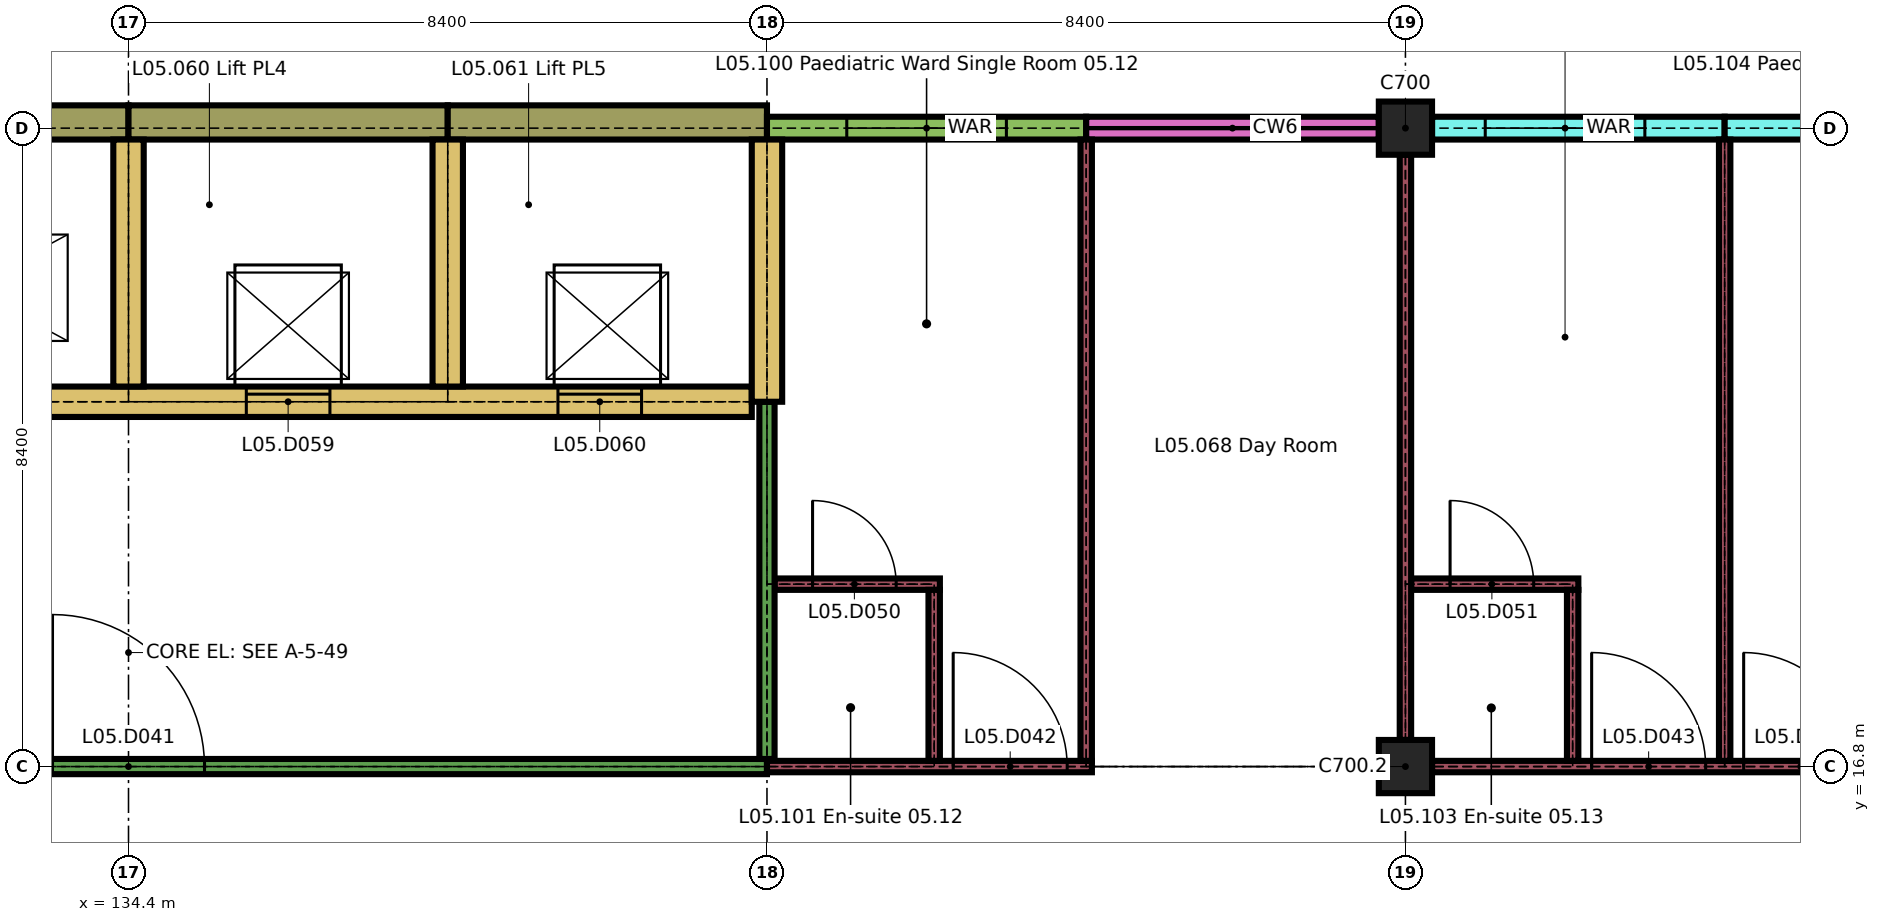
"""IFC4 building model, lengths in metres.
Left out: names, types, materials, properties, quantities, classifications, styles, units other than length and angle.
Written with IfcOpenShell. Run it as: python <this file> out.ifc"""

import sys

from ifc_helpers import new_model, si_unit, direction, frame, frame_2d, origin, origin_2d, place, context, subcontext, project, spatial, rectangle, extrude, element, fill, save


model = new_model("IFC4")
c1 = context("Model", 3, precision=1e-05, world=origin(), true_north=direction((0.0, 1.0)))
c2 = subcontext(c1, "Body", "Model", "MODEL_VIEW")
j1 = project(units=[si_unit("LENGTHUNIT", "METRE"), si_unit("PLANEANGLEUNIT", "RADIAN")], contexts=[c1])
p1 = place(None, origin())
s1 = spatial("IfcSite", under=j1, at=p1, CompositionType="ELEMENT")
p2 = place(p1, origin())
s2 = spatial("IfcBuilding", under=s1, at=p2, CompositionType="ELEMENT")
p3 = place(p2, frame((0.0, 0.0, 22.5)))
s3 = spatial("IfcBuildingStorey", under=s2, at=p3, CompositionType="ELEMENT", Elevation=22.5)
for number, where, z_axis, x_axis in (
    (1, (151.2, 16.8, 0.0), (0.0, 0.0, 1.0), (1.0, 0.0, 0.0)),
    (2, (151.2, 25.2, 0.0), (0.0, 0.0, 1.0), (1.0, 0.0, 0.0)),
):
    element("IfcColumn", number, at=place(p3, frame(where, z_axis=z_axis, x_axis=x_axis)), inside=s3, PredefinedType="COLUMN", context=c2, shape_type="SweptSolid", body=[
        extrude(rectangle(XDim=0.7, YDim=0.7, at=origin_2d()), origin(), (0.0, 0.0, 1.0), 3.26),
    ])
p4 = place(p3, frame((130.2, 25.275, 0.0), z_axis=(0.0, 0.0, 1.0), x_axis=(1.0, 0.0, 0.0)))
e3 = element("IfcWall", 3, at=p4, inside=s3, PredefinedType="SOLIDWALL", context=c2, shape_type="SweptSolid", body=[
    extrude(rectangle(XDim=4.2, YDim=0.45, at=frame_2d((2.1, 0.0))), origin(), (0.0, 0.0, 1.0), 3.26),
])
p5 = place(p3, frame((134.4, 25.275, 0.0), z_axis=(0.0, 0.0, 1.0), x_axis=(1.0, 0.0, 0.0)))
e4 = element("IfcWall", 4, at=p5, inside=s3, PredefinedType="SOLIDWALL", context=c2, shape_type="SweptSolid", body=[
    extrude(rectangle(XDim=4.2, YDim=0.45, at=frame_2d((2.1, 0.0))), origin(), (0.0, 0.0, 1.0), 3.26),
])
p6 = place(p3, frame((138.6, 25.275, 0.0), z_axis=(0.0, 0.0, 1.0), x_axis=(1.0, 0.0, 0.0)))
e5 = element("IfcWall", 5, at=p6, inside=s3, PredefinedType="SOLIDWALL", context=c2, shape_type="SweptSolid", body=[
    extrude(rectangle(XDim=4.2, YDim=0.45, at=frame_2d((2.1, 0.0))), origin(), (0.0, 0.0, 1.0), 3.26),
])
p7 = place(p3, frame((142.8, 25.2, 0.0), z_axis=(0.0, 0.0, 1.0), x_axis=(1.0, 0.0, 0.0)))
e6 = element("IfcWall", 6, at=p7, inside=s3, PredefinedType="SOLIDWALL", context=c2, shape_type="SweptSolid", body=[
    extrude(rectangle(XDim=4.2, YDim=0.3, at=frame_2d((2.1, 0.0))), origin(), (0.0, 0.0, 1.0), 2.96),
])
p8 = place(p7, frame((1.05, 0.0, 0.9)))
e7 = element("IfcOpeningElement", 7, at=p8, cuts=e6, PredefinedType="OPENING", context=c2, shape_type="SweptSolid", body=[
    extrude(rectangle(XDim=2.1, YDim=1.5, at=frame_2d((1.05, 0.75))), frame((0.0, 0.16, 0.0), z_axis=(0.0, -1.0, 0.0), x_axis=(1.0, 0.0, 0.0)), (0.0, 0.0, 1.0), 0.32),
])
p9 = place(p3, frame((147.0, 25.2, 0.0), z_axis=(0.0, 0.0, 1.0), x_axis=(1.0, 0.0, 0.0)))
e8 = element("IfcWall", 8, at=p9, inside=s3, PredefinedType="SOLIDWALL", context=c2, shape_type="SweptSolid", body=[
    extrude(rectangle(XDim=3.85, YDim=0.3, at=frame_2d((1.925, 0.0))), origin(), (0.0, 0.0, 1.0), 0.6),
])
p10 = place(p3, frame((151.55, 25.2, 0.0), z_axis=(0.0, 0.0, 1.0), x_axis=(1.0, 0.0, 0.0)))
e9 = element("IfcWall", 9, at=p10, inside=s3, PredefinedType="SOLIDWALL", context=c2, shape_type="SweptSolid", body=[
    extrude(rectangle(XDim=3.85, YDim=0.3, at=frame_2d((1.925, 0.0))), origin(), (0.0, 0.0, 1.0), 3.26),
])
p11 = place(p10, frame((0.7, 0.0, 0.9)))
e10 = element("IfcOpeningElement", 10, at=p11, cuts=e9, PredefinedType="OPENING", context=c2, shape_type="SweptSolid", body=[
    extrude(rectangle(XDim=2.1, YDim=1.5, at=frame_2d((1.05, 0.75))), frame((0.0, 0.16, 0.0), z_axis=(0.0, -1.0, 0.0), x_axis=(1.0, 0.0, 0.0)), (0.0, 0.0, 1.0), 0.32),
])
p12 = place(p3, frame((155.4, 25.2, 0.0), z_axis=(0.0, 0.0, 1.0), x_axis=(1.0, 0.0, 0.0)))
e11 = element("IfcWall", 11, at=p12, inside=s3, PredefinedType="SOLIDWALL", context=c2, shape_type="SweptSolid", body=[
    extrude(rectangle(XDim=4.2, YDim=0.3, at=frame_2d((2.1, 0.0))), origin(), (0.0, 0.0, 1.0), 3.26),
])
p13 = place(p12, frame((1.05, 0.0, 0.9)))
e12 = element("IfcOpeningElement", 12, at=p13, cuts=e11, PredefinedType="OPENING", context=c2, shape_type="SweptSolid", body=[
    extrude(rectangle(XDim=2.1, YDim=1.5, at=frame_2d((1.05, 0.75))), frame((0.0, 0.16, 0.0), z_axis=(0.0, -1.0, 0.0), x_axis=(1.0, 0.0, 0.0)), (0.0, 0.0, 1.0), 0.32),
])
p14 = place(p3, frame((117.7, 16.8, 0.0), z_axis=(0.0, 0.0, 1.0), x_axis=(1.0, 0.0, 0.0)))
e13 = element("IfcWall", 13, at=p14, inside=s3, PredefinedType="PARTITIONING", context=c2, shape_type="SweptSolid", body=[
    extrude(rectangle(XDim=25.1, YDim=0.2, at=frame_2d((12.55, 0.0))), origin(), (0.0, 0.0, 1.0), 3.26),
])
p15 = place(p14, frame((3.3, 0.0, 0.0)))
e14 = element("IfcOpeningElement", 14, at=p15, cuts=e13, PredefinedType="OPENING", context=c2, shape_type="SweptSolid", body=[
    extrude(rectangle(XDim=1.7, YDim=2.4, at=frame_2d((0.85, 1.2))), frame((0.0, 0.11, 0.0), z_axis=(0.0, -1.0, 0.0), x_axis=(1.0, 0.0, 0.0)), (0.0, 0.0, 1.0), 0.22),
])
p16 = place(p14, frame((15.7, 0.0, 0.0)))
e15 = element("IfcOpeningElement", 15, at=p16, cuts=e13, PredefinedType="OPENING", context=c2, shape_type="SweptSolid", body=[
    extrude(rectangle(XDim=2.0, YDim=2.4, at=frame_2d((1.0, 1.2))), frame((0.0, 0.11, 0.0), z_axis=(0.0, -1.0, 0.0), x_axis=(1.0, 0.0, 0.0)), (0.0, 0.0, 1.0), 0.22),
])
p17 = place(p3, frame((142.8, 16.8, 0.0), z_axis=(0.0, 0.0, 1.0), x_axis=(1.0, 0.0, 0.0)))
e16 = element("IfcWall", 16, at=p17, inside=s3, PredefinedType="PARTITIONING", context=c2, shape_type="SweptSolid", body=[
    extrude(rectangle(XDim=4.275, YDim=0.15, at=frame_2d((2.137, 0.0))), origin(), (0.0, 0.0, 1.0), 3.26),
])
p18 = place(p17, frame((2.45, 0.0, 0.0)))
e17 = element("IfcOpeningElement", 17, at=p18, cuts=e16, PredefinedType="OPENING", context=c2, shape_type="SweptSolid", body=[
    extrude(rectangle(XDim=1.5, YDim=2.4, at=frame_2d((0.75, 1.2))), frame((0.0, 0.085, 0.0), z_axis=(0.0, -1.0, 0.0), x_axis=(1.0, 0.0, 0.0)), (0.0, 0.0, 1.0), 0.17),
])
p19 = place(p3, frame((151.55, 16.8, 0.0), z_axis=(0.0, 0.0, 1.0), x_axis=(1.0, 0.0, 0.0)))
e18 = element("IfcWall", 18, at=p19, inside=s3, PredefinedType="PARTITIONING", context=c2, shape_type="SweptSolid", body=[
    extrude(rectangle(XDim=8.05, YDim=0.15, at=frame_2d((4.025, 0.0))), origin(), (0.0, 0.0, 1.0), 3.26),
])
p20 = place(p19, frame((2.1, 0.0, 0.0)))
e19 = element("IfcOpeningElement", 19, at=p20, cuts=e18, PredefinedType="OPENING", context=c2, shape_type="SweptSolid", body=[
    extrude(rectangle(XDim=1.5, YDim=2.4, at=frame_2d((0.75, 1.2))), frame((0.0, 0.085, 0.0), z_axis=(0.0, -1.0, 0.0), x_axis=(1.0, 0.0, 0.0)), (0.0, 0.0, 1.0), 0.17),
])
p21 = place(p19, frame((4.1, 0.0, 0.0)))
e20 = element("IfcOpeningElement", 20, at=p21, cuts=e18, PredefinedType="OPENING", context=c2, shape_type="SweptSolid", body=[
    extrude(rectangle(XDim=1.5, YDim=2.4, at=frame_2d((0.75, 1.2))), frame((0.0, 0.085, 0.0), z_axis=(0.0, -1.0, 0.0), x_axis=(1.0, 0.0, 0.0)), (0.0, 0.0, 1.0), 0.17),
])
p22 = place(p3, frame((142.9, 19.2, 0.0), z_axis=(0.0, 0.0, 1.0), x_axis=(1.0, 0.0, 0.0)))
e21 = element("IfcWall", 21, at=p22, inside=s3, PredefinedType="PARTITIONING", context=c2, shape_type="SweptSolid", body=[
    extrude(rectangle(XDim=2.175, YDim=0.15, at=frame_2d((1.087, 0.0))), origin(), (0.0, 0.0, 1.0), 3.26),
])
p23 = place(p22, frame((0.5, 0.0, 0.0)))
e22 = element("IfcOpeningElement", 22, at=p23, cuts=e21, PredefinedType="OPENING", context=c2, shape_type="SweptSolid", body=[
    extrude(rectangle(XDim=1.1, YDim=2.1, at=frame_2d((0.55, 1.05))), frame((0.0, 0.085, 0.0), z_axis=(0.0, -1.0, 0.0), x_axis=(1.0, 0.0, 0.0)), (0.0, 0.0, 1.0), 0.17),
])
p24 = place(p3, frame((151.275, 19.2, 0.0), z_axis=(0.0, 0.0, 1.0), x_axis=(1.0, 0.0, 0.0)))
e23 = element("IfcWall", 23, at=p24, inside=s3, PredefinedType="PARTITIONING", context=c2, shape_type="SweptSolid", body=[
    extrude(rectangle(XDim=2.2, YDim=0.15, at=frame_2d((1.1, 0.0))), origin(), (0.0, 0.0, 1.0), 3.26),
])
p25 = place(p24, frame((0.512, 0.0, 0.0)))
e24 = element("IfcOpeningElement", 24, at=p25, cuts=e23, PredefinedType="OPENING", context=c2, shape_type="SweptSolid", body=[
    extrude(rectangle(XDim=1.1, YDim=2.1, at=frame_2d((0.55, 1.05))), frame((0.0, 0.085, 0.0), z_axis=(0.0, -1.0, 0.0), x_axis=(1.0, 0.0, 0.0)), (0.0, 0.0, 1.0), 0.17),
])
p26 = place(p3, frame((117.8, 21.6, 0.0), z_axis=(0.0, 0.0, 1.0), x_axis=(1.0, 0.0, 0.0)))
e25 = element("IfcWall", 25, at=p26, inside=s3, PredefinedType="SHEAR", context=c2, shape_type="SweptSolid", body=[
    extrude(rectangle(XDim=24.8, YDim=0.4, at=frame_2d((12.4, 0.0))), origin(), (0.0, 0.0, 1.0), 3.26),
])
p27 = place(p26, frame((1.35, 0.0, 0.0)))
e26 = element("IfcOpeningElement", 26, at=p27, cuts=e25, PredefinedType="OPENING", context=c2, shape_type="SweptSolid", body=[
    extrude(rectangle(XDim=1.3, YDim=2.1, at=frame_2d((0.65, 1.05))), frame((0.0, 0.21, 0.0), z_axis=(0.0, -1.0, 0.0), x_axis=(1.0, 0.0, 0.0)), (0.0, 0.0, 1.0), 0.42),
])
p28 = place(p26, frame((5.45, 0.0, 0.0)))
e27 = element("IfcOpeningElement", 27, at=p28, cuts=e25, PredefinedType="OPENING", context=c2, shape_type="SweptSolid", body=[
    extrude(rectangle(XDim=1.3, YDim=2.1, at=frame_2d((0.65, 1.05))), frame((0.0, 0.21, 0.0), z_axis=(0.0, -1.0, 0.0), x_axis=(1.0, 0.0, 0.0)), (0.0, 0.0, 1.0), 0.42),
])
p29 = place(p26, frame((9.65, 0.0, 0.0)))
e28 = element("IfcOpeningElement", 28, at=p29, cuts=e25, PredefinedType="OPENING", context=c2, shape_type="SweptSolid", body=[
    extrude(rectangle(XDim=1.3, YDim=2.1, at=frame_2d((0.65, 1.05))), frame((0.0, 0.21, 0.0), z_axis=(0.0, -1.0, 0.0), x_axis=(1.0, 0.0, 0.0)), (0.0, 0.0, 1.0), 0.42),
])
p30 = place(p26, frame((13.85, 0.0, 0.0)))
e29 = element("IfcOpeningElement", 29, at=p30, cuts=e25, PredefinedType="OPENING", context=c2, shape_type="SweptSolid", body=[
    extrude(rectangle(XDim=1.3, YDim=2.1, at=frame_2d((0.65, 1.05))), frame((0.0, 0.21, 0.0), z_axis=(0.0, -1.0, 0.0), x_axis=(1.0, 0.0, 0.0)), (0.0, 0.0, 1.0), 0.42),
])
p31 = place(p26, frame((18.15, 0.0, 0.0)))
e30 = element("IfcOpeningElement", 30, at=p31, cuts=e25, PredefinedType="OPENING", context=c2, shape_type="SweptSolid", body=[
    extrude(rectangle(XDim=1.1, YDim=2.1, at=frame_2d((0.55, 1.05))), frame((0.0, 0.21, 0.0), z_axis=(0.0, -1.0, 0.0), x_axis=(1.0, 0.0, 0.0)), (0.0, 0.0, 1.0), 0.42),
])
p32 = place(p26, frame((22.25, 0.0, 0.0)))
e31 = element("IfcOpeningElement", 31, at=p32, cuts=e25, PredefinedType="OPENING", context=c2, shape_type="SweptSolid", body=[
    extrude(rectangle(XDim=1.1, YDim=2.1, at=frame_2d((0.55, 1.05))), frame((0.0, 0.21, 0.0), z_axis=(0.0, -1.0, 0.0), x_axis=(1.0, 0.0, 0.0)), (0.0, 0.0, 1.0), 0.42),
])
for number, where, z_axis, x_axis in (
    (32, (134.4, 21.8, 0.0), (0.0, 0.0, 1.0), (0.0, 1.0, 0.0)),
    (33, (138.6, 21.8, 0.0), (0.0, 0.0, 1.0), (0.0, 1.0, 0.0)),
):
    element("IfcWall", number, at=place(p3, frame(where, z_axis=z_axis, x_axis=x_axis)), inside=s3, PredefinedType="SHEAR", context=c2, shape_type="SweptSolid", body=[
        extrude(rectangle(XDim=3.25, YDim=0.4, at=frame_2d((1.625, 0.0))), origin(), (0.0, 0.0, 1.0), 3.26),
    ])
p33 = place(p3, frame((142.8, 16.9, 0.0), z_axis=(0.0, 0.0, 1.0), x_axis=(0.0, 1.0, 0.0)))
e34 = element("IfcWall", 34, at=p33, inside=s3, PredefinedType="PARTITIONING", context=c2, shape_type="SweptSolid", body=[
    extrude(rectangle(XDim=4.7, YDim=0.2, at=frame_2d((2.35, 0.0))), origin(), (0.0, 0.0, 1.0), 3.26),
])
p34 = place(p3, frame((142.8, 21.6, 0.0), z_axis=(0.0, 0.0, 1.0), x_axis=(0.0, 1.0, 0.0)))
e35 = element("IfcWall", 35, at=p34, inside=s3, PredefinedType="SHEAR", context=c2, shape_type="SweptSolid", body=[
    extrude(rectangle(XDim=3.45, YDim=0.4, at=frame_2d((1.725, 0.0))), origin(), (0.0, 0.0, 1.0), 3.26),
])
p35 = place(p3, frame((145.0, 16.875, 0.0), z_axis=(0.0, 0.0, 1.0), x_axis=(0.0, 1.0, 0.0)))
e36 = element("IfcWall", 36, at=p35, inside=s3, PredefinedType="PARTITIONING", context=c2, shape_type="SweptSolid", body=[
    extrude(rectangle(XDim=2.25, YDim=0.15, at=frame_2d((1.125, 0.0))), origin(), (0.0, 0.0, 1.0), 3.26),
])
p36 = place(p3, frame((147.0, 16.875, 0.0), z_axis=(0.0, 0.0, 1.0), x_axis=(0.0, 1.0, 0.0)))
e37 = element("IfcWall", 37, at=p36, inside=s3, PredefinedType="PARTITIONING", context=c2, shape_type="SweptSolid", body=[
    extrude(rectangle(XDim=8.175, YDim=0.15, at=frame_2d((4.087, 0.0))), origin(), (0.0, 0.0, 1.0), 3.26),
])
p37 = place(p3, frame((151.2, 17.15, 0.0), z_axis=(0.0, 0.0, 1.0), x_axis=(0.0, 1.0, 0.0)))
e38 = element("IfcWall", 38, at=p37, inside=s3, PredefinedType="PARTITIONING", context=c2, shape_type="SweptSolid", body=[
    extrude(rectangle(XDim=7.7, YDim=0.15, at=frame_2d((3.85, 0.0))), origin(), (0.0, 0.0, 1.0), 3.26),
])
p38 = place(p3, frame((153.4, 16.875, 0.0), z_axis=(0.0, 0.0, 1.0), x_axis=(0.0, 1.0, 0.0)))
e39 = element("IfcWall", 39, at=p38, inside=s3, PredefinedType="PARTITIONING", context=c2, shape_type="SweptSolid", body=[
    extrude(rectangle(XDim=2.25, YDim=0.15, at=frame_2d((1.125, 0.0))), origin(), (0.0, 0.0, 1.0), 3.26),
])
p39 = place(p3, frame((155.4, 16.875, 0.0), z_axis=(0.0, 0.0, 1.0), x_axis=(0.0, 1.0, 0.0)))
e40 = element("IfcWall", 40, at=p39, inside=s3, PredefinedType="PARTITIONING", context=c2, shape_type="SweptSolid", body=[
    extrude(rectangle(XDim=8.175, YDim=0.15, at=frame_2d((4.087, 0.0))), origin(), (0.0, 0.0, 1.0), 3.26),
])
p40 = place(p8, origin())
e41 = element("IfcWindow", 41, at=p40, inside=s3, PartitioningType="DOUBLE_PANEL_VERTICAL", PredefinedType="WINDOW", context=c2, shape_type="SweptSolid", body=[
    extrude(rectangle(XDim=2.1, YDim=1.5, at=frame_2d((1.05, 0.75))), frame((0.0, 0.05, 0.0), z_axis=(0.0, -1.0, 0.0), x_axis=(1.0, 0.0, 0.0)), (0.0, 0.0, 1.0), 0.1),
])
fill(e7, e41)
p41 = place(p11, origin())
e42 = element("IfcWindow", 42, at=p41, inside=s3, PartitioningType="DOUBLE_PANEL_VERTICAL", PredefinedType="WINDOW", context=c2, shape_type="SweptSolid", body=[
    extrude(rectangle(XDim=2.1, YDim=1.5, at=frame_2d((1.05, 0.75))), frame((0.0, 0.05, 0.0), z_axis=(0.0, -1.0, 0.0), x_axis=(1.0, 0.0, 0.0)), (0.0, 0.0, 1.0), 0.1),
])
fill(e10, e42)
p42 = place(p16, origin())
e43 = element("IfcDoor", 43, at=p42, inside=s3, OperationType="SINGLE_SWING_RIGHT", PredefinedType="DOOR", context=c2, shape_type="SweptSolid", body=[
    extrude(rectangle(XDim=2.0, YDim=2.4, at=frame_2d((1.0, 1.2))), frame((0.0, 0.03, 0.0), z_axis=(0.0, -1.0, 0.0), x_axis=(1.0, 0.0, 0.0)), (0.0, 0.0, 1.0), 0.06),
])
fill(e15, e43)
p43 = place(p18, origin())
e44 = element("IfcDoor", 44, at=p43, inside=s3, OperationType="SINGLE_SWING_RIGHT", PredefinedType="DOOR", context=c2, shape_type="SweptSolid", body=[
    extrude(rectangle(XDim=1.5, YDim=2.4, at=frame_2d((0.75, 1.2))), frame((0.0, 0.03, 0.0), z_axis=(0.0, -1.0, 0.0), x_axis=(1.0, 0.0, 0.0)), (0.0, 0.0, 1.0), 0.06),
])
fill(e17, e44)
p44 = place(p20, origin())
e45 = element("IfcDoor", 45, at=p44, inside=s3, OperationType="SINGLE_SWING_RIGHT", PredefinedType="DOOR", context=c2, shape_type="SweptSolid", body=[
    extrude(rectangle(XDim=1.5, YDim=2.4, at=frame_2d((0.75, 1.2))), frame((0.0, 0.03, 0.0), z_axis=(0.0, -1.0, 0.0), x_axis=(1.0, 0.0, 0.0)), (0.0, 0.0, 1.0), 0.06),
])
fill(e19, e45)
p45 = place(p21, origin())
e46 = element("IfcDoor", 46, at=p45, inside=s3, OperationType="SINGLE_SWING_RIGHT", PredefinedType="DOOR", context=c2, shape_type="SweptSolid", body=[
    extrude(rectangle(XDim=1.5, YDim=2.4, at=frame_2d((0.75, 1.2))), frame((0.0, 0.03, 0.0), z_axis=(0.0, -1.0, 0.0), x_axis=(1.0, 0.0, 0.0)), (0.0, 0.0, 1.0), 0.06),
])
fill(e20, e46)
p46 = place(p23, origin())
e47 = element("IfcDoor", 47, at=p46, inside=s3, OperationType="SINGLE_SWING_RIGHT", PredefinedType="DOOR", context=c2, shape_type="SweptSolid", body=[
    extrude(rectangle(XDim=1.1, YDim=2.1, at=frame_2d((0.55, 1.05))), frame((0.0, 0.025, 0.0), z_axis=(0.0, -1.0, 0.0), x_axis=(1.0, 0.0, 0.0)), (0.0, 0.0, 1.0), 0.05),
])
fill(e22, e47)
p47 = place(p25, origin())
e48 = element("IfcDoor", 48, at=p47, inside=s3, OperationType="SINGLE_SWING_RIGHT", PredefinedType="DOOR", context=c2, shape_type="SweptSolid", body=[
    extrude(rectangle(XDim=1.1, YDim=2.1, at=frame_2d((0.55, 1.05))), frame((0.0, 0.025, 0.0), z_axis=(0.0, -1.0, 0.0), x_axis=(1.0, 0.0, 0.0)), (0.0, 0.0, 1.0), 0.05),
])
fill(e24, e48)
p48 = place(p31, origin())
e49 = element("IfcDoor", 49, at=p48, inside=s3, OperationType="SLIDING_TO_LEFT", PredefinedType="DOOR", context=c2, shape_type="SweptSolid", body=[
    extrude(rectangle(XDim=1.1, YDim=2.1, at=frame_2d((0.55, 1.05))), frame((0.0, 0.025, 0.0), z_axis=(0.0, -1.0, 0.0), x_axis=(1.0, 0.0, 0.0)), (0.0, 0.0, 1.0), 0.05),
])
fill(e30, e49)
p49 = place(p32, origin())
e50 = element("IfcDoor", 50, at=p49, inside=s3, OperationType="SLIDING_TO_LEFT", PredefinedType="DOOR", context=c2, shape_type="SweptSolid", body=[
    extrude(rectangle(XDim=1.1, YDim=2.1, at=frame_2d((0.55, 1.05))), frame((0.0, 0.025, 0.0), z_axis=(0.0, -1.0, 0.0), x_axis=(1.0, 0.0, 0.0)), (0.0, 0.0, 1.0), 0.05),
])
fill(e31, e50)
save(model, sys.argv[1])
